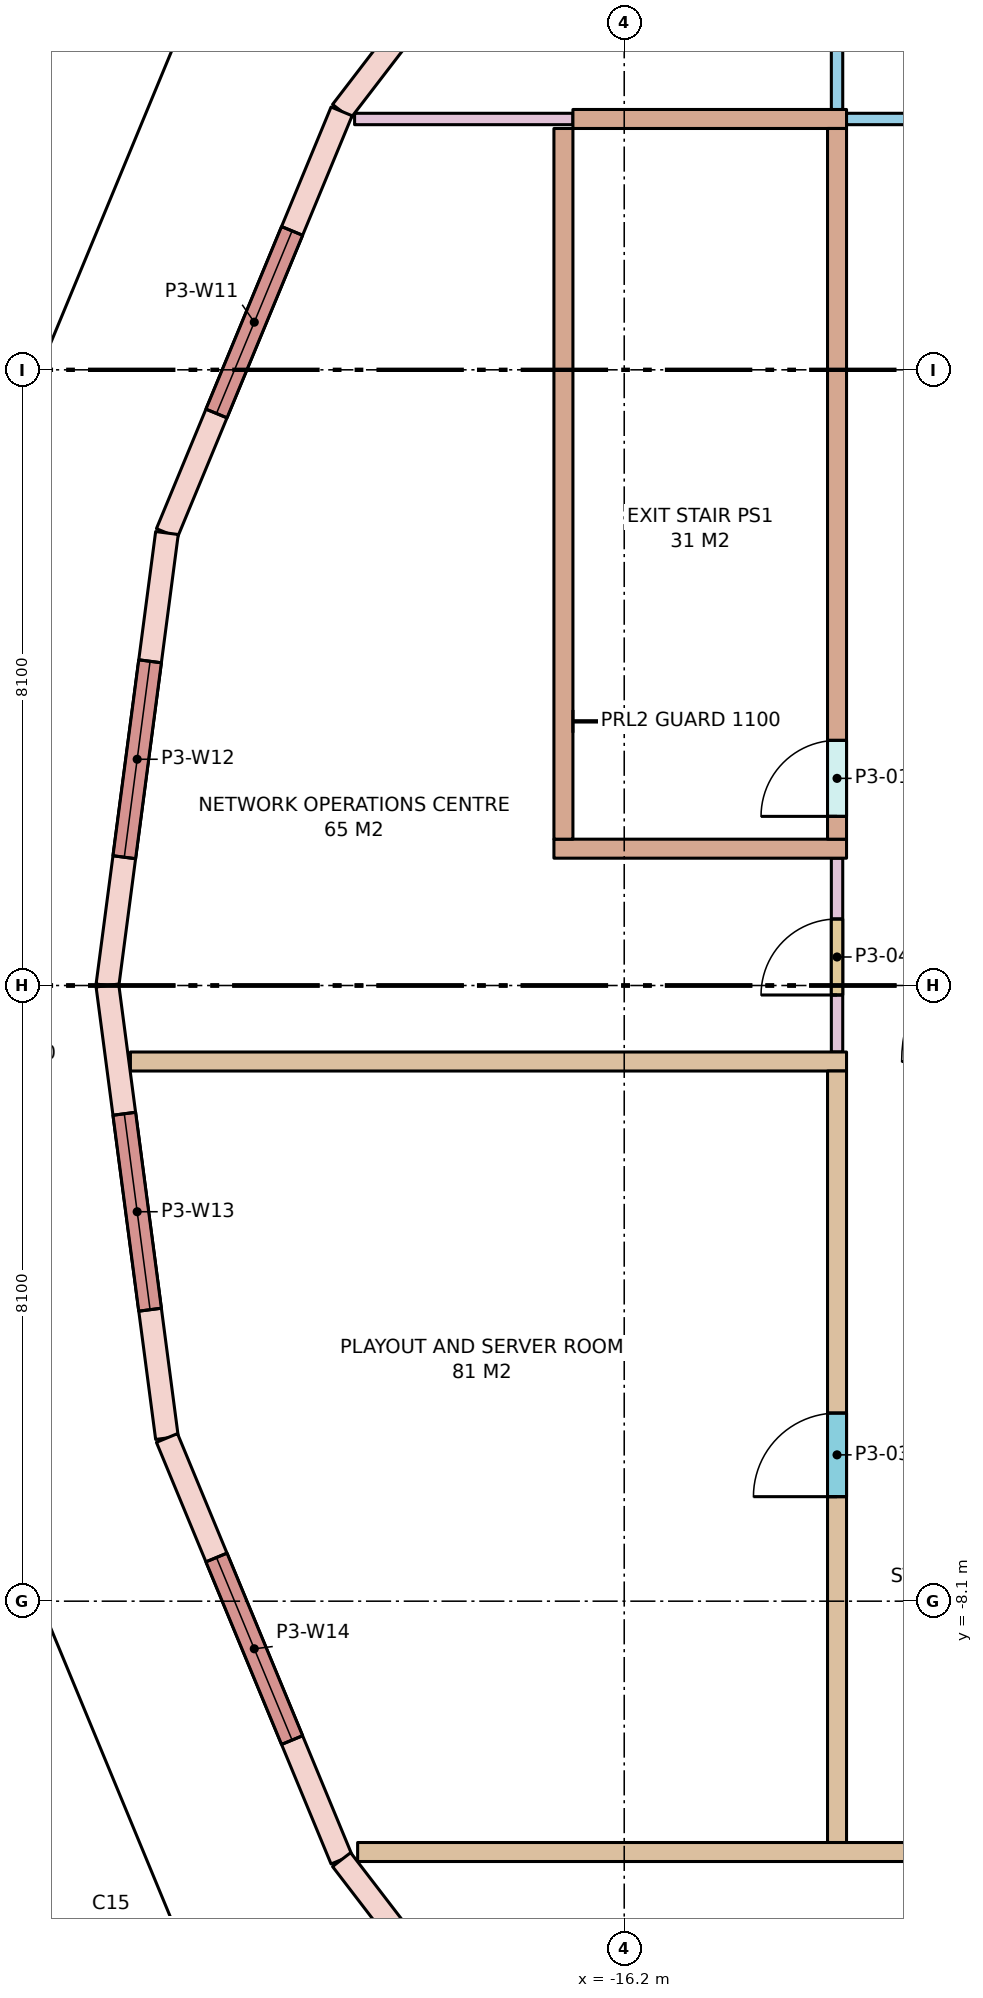
"""IFC4 building model, lengths in metres.
Left out: names, types, materials, properties, quantities, classifications, styles, units other than length and angle.
Written with IfcOpenShell. Run it as: python <this file> out.ifc"""

import sys

from ifc_helpers import new_model, si_unit, direction, frame, frame_2d, origin, place, context, subcontext, project, spatial, rectangle, extrude, element, fill, save


model = new_model("IFC4")
c1 = context("Model", 3, precision=1e-05, world=origin(), true_north=direction((0.0, 1.0)))
c2 = subcontext(c1, "Body", "Model", "MODEL_VIEW")
j1 = project(units=[si_unit("LENGTHUNIT", "METRE"), si_unit("PLANEANGLEUNIT", "RADIAN")], contexts=[c1])
p1 = place(None, origin())
s1 = spatial("IfcSite", under=j1, at=p1, CompositionType="ELEMENT")
p2 = place(p1, origin())
s2 = spatial("IfcBuilding", under=s1, at=p2, CompositionType="ELEMENT")
p3 = place(p2, frame((0.0, 0.0, 20.0)))
s3 = spatial("IfcBuildingStorey", under=s2, at=p3, CompositionType="ELEMENT", Elevation=20.0)
p4 = place(p3, frame((-16.263, 16.263, 0.0), z_axis=(0.0, 0.0, 1.0), x_axis=(-0.608778912074, -0.793339924758, 0.0)))
e1 = element("IfcWall", 1, at=p4, inside=s3, PredefinedType="STANDARD", context=c2, shape_type="SweptSolid", body=[
    extrude(rectangle(XDim=6.004, YDim=0.3, at=frame_2d((3.002, 0.0))), origin(), (0.0, 0.0, 1.0), 6.72),
])
p5 = place(p4, frame((1.702, 0.0, 0.8)))
e2 = element("IfcOpeningElement", 2, at=p5, cuts=e1, PredefinedType="OPENING", context=c2, shape_type="SweptSolid", body=[
    extrude(rectangle(XDim=2.6, YDim=5.4, at=frame_2d((1.3, 2.7))), frame((0.0, 0.16, 0.0), z_axis=(0.0, -1.0, 0.0), x_axis=(1.0, 0.0, 0.0)), (0.0, 0.0, 1.0), 0.32),
])
p6 = place(p3, frame((-19.919, 11.5, 0.0), z_axis=(0.0, 0.0, 1.0), x_axis=(-0.382671411433, -0.923884511653, 0.0)))
e3 = element("IfcWall", 3, at=p6, inside=s3, PredefinedType="STANDARD", context=c2, shape_type="SweptSolid", body=[
    extrude(rectangle(XDim=6.004, YDim=0.3, at=frame_2d((3.002, 0.0))), origin(), (0.0, 0.0, 1.0), 6.72),
])
p7 = place(p6, frame((1.702, 0.0, 0.8)))
e4 = element("IfcOpeningElement", 4, at=p7, cuts=e3, PredefinedType="OPENING", context=c2, shape_type="SweptSolid", body=[
    extrude(rectangle(XDim=2.6, YDim=5.4, at=frame_2d((1.3, 2.7))), frame((0.0, 0.16, 0.0), z_axis=(0.0, -1.0, 0.0), x_axis=(1.0, 0.0, 0.0)), (0.0, 0.0, 1.0), 0.32),
])
p8 = place(p3, frame((-22.216, 5.953, 0.0), z_axis=(0.0, 0.0, 1.0), x_axis=(-0.130522880875, -0.991445297315, 0.0)))
e5 = element("IfcWall", 5, at=p8, inside=s3, PredefinedType="STANDARD", context=c2, shape_type="SweptSolid", body=[
    extrude(rectangle(XDim=6.004, YDim=0.3, at=frame_2d((3.002, 0.0))), origin(), (0.0, 0.0, 1.0), 6.72),
])
p9 = place(p8, frame((1.702, 0.0, 0.8)))
e6 = element("IfcOpeningElement", 6, at=p9, cuts=e5, PredefinedType="OPENING", context=c2, shape_type="SweptSolid", body=[
    extrude(rectangle(XDim=2.6, YDim=5.4, at=frame_2d((1.3, 2.7))), frame((0.0, 0.16, 0.0), z_axis=(0.0, -1.0, 0.0), x_axis=(1.0, 0.0, 0.0)), (0.0, 0.0, 1.0), 0.32),
])
p10 = place(p3, frame((-23.0, 0.0, 0.0), z_axis=(0.0, 0.0, 1.0), x_axis=(0.130522880875, -0.991445297315, 0.0)))
e7 = element("IfcWall", 7, at=p10, inside=s3, PredefinedType="STANDARD", context=c2, shape_type="SweptSolid", body=[
    extrude(rectangle(XDim=6.004, YDim=0.3, at=frame_2d((3.002, 0.0))), origin(), (0.0, 0.0, 1.0), 6.72),
])
p11 = place(p10, frame((1.702, 0.0, 0.8)))
e8 = element("IfcOpeningElement", 8, at=p11, cuts=e7, PredefinedType="OPENING", context=c2, shape_type="SweptSolid", body=[
    extrude(rectangle(XDim=2.6, YDim=5.4, at=frame_2d((1.3, 2.7))), frame((0.0, 0.16, 0.0), z_axis=(0.0, -1.0, 0.0), x_axis=(1.0, 0.0, 0.0)), (0.0, 0.0, 1.0), 0.32),
])
p12 = place(p3, frame((-22.216, -5.953, 0.0), z_axis=(0.0, 0.0, 1.0), x_axis=(0.382671411433, -0.923884511653, 0.0)))
e9 = element("IfcWall", 9, at=p12, inside=s3, PredefinedType="STANDARD", context=c2, shape_type="SweptSolid", body=[
    extrude(rectangle(XDim=6.004, YDim=0.3, at=frame_2d((3.002, 0.0))), origin(), (0.0, 0.0, 1.0), 6.72),
])
p13 = place(p12, frame((1.702, 0.0, 0.8)))
e10 = element("IfcOpeningElement", 10, at=p13, cuts=e9, PredefinedType="OPENING", context=c2, shape_type="SweptSolid", body=[
    extrude(rectangle(XDim=2.6, YDim=5.4, at=frame_2d((1.3, 2.7))), frame((0.0, 0.16, 0.0), z_axis=(0.0, -1.0, 0.0), x_axis=(1.0, 0.0, 0.0)), (0.0, 0.0, 1.0), 0.32),
])
p14 = place(p3, frame((-19.919, -11.5, 0.0), z_axis=(0.0, 0.0, 1.0), x_axis=(0.608778912074, -0.793339924758, 0.0)))
e11 = element("IfcWall", 11, at=p14, inside=s3, PredefinedType="STANDARD", context=c2, shape_type="SweptSolid", body=[
    extrude(rectangle(XDim=6.004, YDim=0.3, at=frame_2d((3.002, 0.0))), origin(), (0.0, 0.0, 1.0), 6.72),
])
p15 = place(p14, frame((1.702, 0.0, 0.8)))
e12 = element("IfcOpeningElement", 12, at=p15, cuts=e11, PredefinedType="OPENING", context=c2, shape_type="SweptSolid", body=[
    extrude(rectangle(XDim=2.6, YDim=5.4, at=frame_2d((1.3, 2.7))), frame((0.0, 0.16, 0.0), z_axis=(0.0, -1.0, 0.0), x_axis=(1.0, 0.0, 0.0)), (0.0, 0.0, 1.0), 0.32),
])
p16 = place(p3, frame((-19.748, 11.4, 0.0), z_axis=(0.0, 0.0, 1.0), x_axis=(1.0, 0.0, 0.0)))
e13 = element("IfcWall", 13, at=p16, inside=s3, PredefinedType="PARTITIONING", context=c2, shape_type="SweptSolid", body=[
    extrude(rectangle(XDim=2.873, YDim=0.15, at=frame_2d((1.436, 0.0))), origin(), (0.0, 0.0, 1.0), 6.72),
])
p17 = place(p3, frame((-16.875, 11.4, 0.0), z_axis=(0.0, 0.0, 1.0), x_axis=(1.0, 0.0, 0.0)))
e14 = element("IfcWall", 14, at=p17, inside=s3, PredefinedType="STANDARD", context=c2, shape_type="SweptSolid", body=[
    extrude(rectangle(XDim=3.6, YDim=0.25, at=frame_2d((1.8, 0.0))), origin(), (0.0, 0.0, 1.0), 6.72),
])
p18 = place(p3, frame((-13.4, 11.525, 0.0), z_axis=(0.0, 0.0, 1.0), x_axis=(0.0, 1.0, 0.0)))
e15 = element("IfcWall", 15, at=p18, inside=s3, PredefinedType="PARTITIONING", context=c2, shape_type="SweptSolid", body=[
    extrude(rectangle(XDim=5.8, YDim=0.15, at=frame_2d((2.9, 0.0))), origin(), (0.0, 0.0, 1.0), 6.72),
])
p19 = place(p3, frame((-17.125, 1.8, 0.0), z_axis=(0.0, 0.0, 1.0), x_axis=(1.0, 0.0, 0.0)))
e16 = element("IfcWall", 16, at=p19, inside=s3, PredefinedType="STANDARD", context=c2, shape_type="SweptSolid", body=[
    extrude(rectangle(XDim=3.85, YDim=0.25, at=frame_2d((1.925, 0.0))), origin(), (0.0, 0.0, 1.0), 6.72),
])
p20 = place(p3, frame((-17.0, 1.925, 0.0), z_axis=(0.0, 0.0, 1.0), x_axis=(0.0, 1.0, 0.0)))
e17 = element("IfcWall", 17, at=p20, inside=s3, PredefinedType="STANDARD", context=c2, shape_type="SweptSolid", body=[
    extrude(rectangle(XDim=9.35, YDim=0.25, at=frame_2d((4.675, 0.0))), origin(), (0.0, 0.0, 1.0), 6.72),
])
p21 = place(p3, frame((-13.4, -0.875, 0.0), z_axis=(0.0, 0.0, 1.0), x_axis=(0.0, 1.0, 0.0)))
e18 = element("IfcWall", 18, at=p21, inside=s3, PredefinedType="PARTITIONING", context=c2, shape_type="SweptSolid", body=[
    extrude(rectangle(XDim=2.55, YDim=0.15, at=frame_2d((1.275, 0.0))), origin(), (0.0, 0.0, 1.0), 6.72),
])
p22 = place(p21, frame((0.75, 0.0, 0.0)))
e19 = element("IfcOpeningElement", 19, at=p22, cuts=e18, PredefinedType="OPENING", context=c2, shape_type="SweptSolid", body=[
    extrude(rectangle(XDim=1.0, YDim=2.1, at=frame_2d((0.5, 1.05))), frame((0.0, 0.085, 0.0), z_axis=(0.0, -1.0, 0.0), x_axis=(1.0, 0.0, 0.0)), (0.0, 0.0, 1.0), 0.17),
])
p23 = place(p3, frame((-22.697, -1.0, 0.0), z_axis=(0.0, 0.0, 1.0), x_axis=(1.0, 0.0, 0.0)))
e20 = element("IfcWall", 20, at=p23, inside=s3, PredefinedType="PARTITIONING", context=c2, shape_type="SweptSolid", body=[
    extrude(rectangle(XDim=9.422, YDim=0.25, at=frame_2d((4.711, 0.0))), origin(), (0.0, 0.0, 1.0), 6.72),
])
p24 = place(p3, frame((-13.4, 1.925, 0.0), z_axis=(0.0, 0.0, 1.0), x_axis=(0.0, 1.0, 0.0)))
e21 = element("IfcWall", 21, at=p24, inside=s3, PredefinedType="STANDARD", context=c2, shape_type="SweptSolid", body=[
    extrude(rectangle(XDim=9.35, YDim=0.25, at=frame_2d((4.675, 0.0))), origin(), (0.0, 0.0, 1.0), 6.72),
])
p25 = place(p24, frame((0.3, 0.0, 0.0)))
e22 = element("IfcOpeningElement", 22, at=p25, cuts=e21, PredefinedType="OPENING", context=c2, shape_type="SweptSolid", body=[
    extrude(rectangle(XDim=1.0, YDim=2.1, at=frame_2d((0.5, 1.05))), frame((0.0, 0.135, 0.0), z_axis=(0.0, -1.0, 0.0), x_axis=(1.0, 0.0, 0.0)), (0.0, 0.0, 1.0), 0.27),
])
p26 = place(p3, frame((-13.4, -11.275, 0.0), z_axis=(0.0, 0.0, 1.0), x_axis=(0.0, 1.0, 0.0)))
e23 = element("IfcWall", 23, at=p26, inside=s3, PredefinedType="PARTITIONING", context=c2, shape_type="SweptSolid", body=[
    extrude(rectangle(XDim=10.15, YDim=0.25, at=frame_2d((5.075, 0.0))), origin(), (0.0, 0.0, 1.0), 6.72),
])
p27 = place(p26, frame((4.55, 0.0, 0.0)))
e24 = element("IfcOpeningElement", 24, at=p27, cuts=e23, PredefinedType="OPENING", context=c2, shape_type="SweptSolid", body=[
    extrude(rectangle(XDim=1.1, YDim=2.1, at=frame_2d((0.55, 1.05))), frame((0.0, 0.135, 0.0), z_axis=(0.0, -1.0, 0.0), x_axis=(1.0, 0.0, 0.0)), (0.0, 0.0, 1.0), 0.27),
])
p28 = place(p3, frame((-13.275, 11.4, 0.0), z_axis=(0.0, 0.0, 1.0), x_axis=(1.0, 0.0, 0.0)))
e25 = element("IfcWall", 25, at=p28, inside=s3, PredefinedType="PARTITIONING", context=c2, shape_type="SweptSolid", body=[
    extrude(rectangle(XDim=12.0, YDim=0.15, at=frame_2d((6.0, 0.0))), origin(), (0.0, 0.0, 1.0), 6.72),
])
p29 = place(p28, frame((3.45, 0.0, 0.0)))
e26 = element("IfcOpeningElement", 26, at=p29, cuts=e25, PredefinedType="OPENING", context=c2, shape_type="SweptSolid", body=[
    extrude(rectangle(XDim=1.0, YDim=2.1, at=frame_2d((0.5, 1.05))), frame((0.0, 0.085, 0.0), z_axis=(0.0, -1.0, 0.0), x_axis=(1.0, 0.0, 0.0)), (0.0, 0.0, 1.0), 0.17),
])
p30 = place(p28, frame((9.5, 0.0, 0.0)))
e27 = element("IfcOpeningElement", 27, at=p30, cuts=e25, PredefinedType="OPENING", context=c2, shape_type="SweptSolid", body=[
    extrude(rectangle(XDim=1.0, YDim=2.1, at=frame_2d((0.5, 1.05))), frame((0.0, 0.085, 0.0), z_axis=(0.0, -1.0, 0.0), x_axis=(1.0, 0.0, 0.0)), (0.0, 0.0, 1.0), 0.17),
])
p31 = place(p3, frame((-19.708, -11.4, 0.0), z_axis=(0.0, 0.0, 1.0), x_axis=(1.0, 0.0, 0.0)))
e28 = element("IfcWall", 28, at=p31, inside=s3, PredefinedType="PARTITIONING", context=c2, shape_type="SweptSolid", body=[
    extrude(rectangle(XDim=11.833, YDim=0.25, at=frame_2d((5.916, 0.0))), origin(), (0.0, 0.0, 1.0), 6.72),
])
p32 = place(p31, frame((8.583, 0.0, 0.0)))
e29 = element("IfcOpeningElement", 29, at=p32, cuts=e28, PredefinedType="OPENING", context=c2, shape_type="SweptSolid", body=[
    extrude(rectangle(XDim=1.1, YDim=2.1, at=frame_2d((0.55, 1.05))), frame((0.0, 0.135, 0.0), z_axis=(0.0, -1.0, 0.0), x_axis=(1.0, 0.0, 0.0)), (0.0, 0.0, 1.0), 0.27),
])
p33 = place(p7, origin())
e30 = element("IfcWindow", 30, at=p33, inside=s3, PartitioningType="SINGLE_PANEL", PredefinedType="WINDOW", context=c2, shape_type="SweptSolid", body=[
    extrude(rectangle(XDim=2.6, YDim=5.4, at=frame_2d((1.3, 2.7))), frame((0.0, 0.03, 0.0), z_axis=(0.0, -1.0, 0.0), x_axis=(1.0, 0.0, 0.0)), (0.0, 0.0, 1.0), 0.06),
])
fill(e4, e30)
p34 = place(p9, origin())
e31 = element("IfcWindow", 31, at=p34, inside=s3, PartitioningType="SINGLE_PANEL", PredefinedType="WINDOW", context=c2, shape_type="SweptSolid", body=[
    extrude(rectangle(XDim=2.6, YDim=5.4, at=frame_2d((1.3, 2.7))), frame((0.0, 0.03, 0.0), z_axis=(0.0, -1.0, 0.0), x_axis=(1.0, 0.0, 0.0)), (0.0, 0.0, 1.0), 0.06),
])
fill(e6, e31)
p35 = place(p11, origin())
e32 = element("IfcWindow", 32, at=p35, inside=s3, PartitioningType="SINGLE_PANEL", PredefinedType="WINDOW", context=c2, shape_type="SweptSolid", body=[
    extrude(rectangle(XDim=2.6, YDim=5.4, at=frame_2d((1.3, 2.7))), frame((0.0, 0.03, 0.0), z_axis=(0.0, -1.0, 0.0), x_axis=(1.0, 0.0, 0.0)), (0.0, 0.0, 1.0), 0.06),
])
fill(e8, e32)
p36 = place(p13, origin())
e33 = element("IfcWindow", 33, at=p36, inside=s3, PartitioningType="SINGLE_PANEL", PredefinedType="WINDOW", context=c2, shape_type="SweptSolid", body=[
    extrude(rectangle(XDim=2.6, YDim=5.4, at=frame_2d((1.3, 2.7))), frame((0.0, 0.03, 0.0), z_axis=(0.0, -1.0, 0.0), x_axis=(1.0, 0.0, 0.0)), (0.0, 0.0, 1.0), 0.06),
])
fill(e10, e33)
p37 = place(p25, origin())
e34 = element("IfcDoor", 34, at=p37, inside=s3, OperationType="SINGLE_SWING_LEFT", PredefinedType="DOOR", context=c2, shape_type="SweptSolid", body=[
    extrude(rectangle(XDim=1.0, YDim=2.1, at=frame_2d((0.5, 1.05))), frame((0.0, 0.025, 0.0), z_axis=(0.0, -1.0, 0.0), x_axis=(1.0, 0.0, 0.0)), (0.0, 0.0, 1.0), 0.05),
])
fill(e22, e34)
p38 = place(p27, origin())
e35 = element("IfcDoor", 35, at=p38, inside=s3, OperationType="SINGLE_SWING_LEFT", PredefinedType="DOOR", context=c2, shape_type="SweptSolid", body=[
    extrude(rectangle(XDim=1.1, YDim=2.1, at=frame_2d((0.55, 1.05))), frame((0.0, 0.025, 0.0), z_axis=(0.0, -1.0, 0.0), x_axis=(1.0, 0.0, 0.0)), (0.0, 0.0, 1.0), 0.05),
])
fill(e24, e35)
p39 = place(p22, origin())
e36 = element("IfcDoor", 36, at=p39, inside=s3, OperationType="SINGLE_SWING_LEFT", PredefinedType="DOOR", context=c2, shape_type="SweptSolid", body=[
    extrude(rectangle(XDim=1.0, YDim=2.1, at=frame_2d((0.5, 1.05))), frame((0.0, 0.025, 0.0), z_axis=(0.0, -1.0, 0.0), x_axis=(1.0, 0.0, 0.0)), (0.0, 0.0, 1.0), 0.05),
])
fill(e19, e36)
save(model, sys.argv[1])
